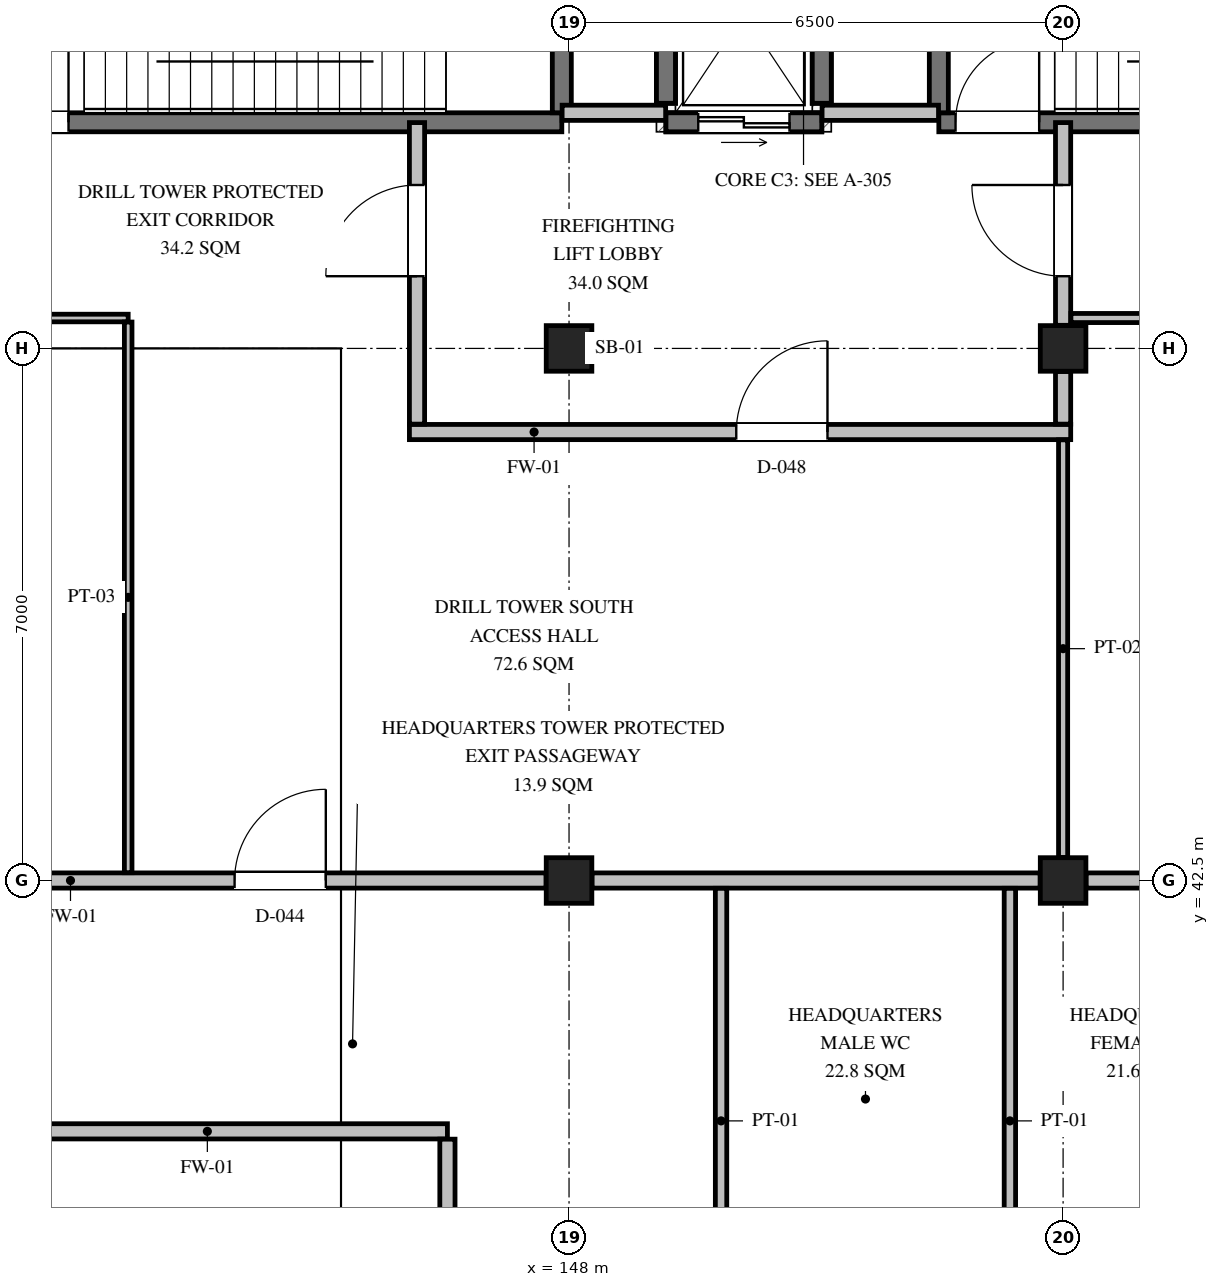
"""IFC4 building model, lengths in metres.
Left out: names, types, materials, properties, quantities, classifications, styles, units other than length and angle.
Written with IfcOpenShell. Run it as: python <this file> out.ifc"""

import sys

from ifc_helpers import new_model, si_unit, direction, frame, frame_2d, origin, origin_2d, place, context, subcontext, project, spatial, rectangle, extrude, element, fill, save


model = new_model("IFC4")
c1 = context("Model", 3, precision=1e-05, world=origin(), true_north=direction((0.0, 1.0)))
c2 = subcontext(c1, "Body", "Model", "MODEL_VIEW")
j1 = project(units=[si_unit("LENGTHUNIT", "METRE"), si_unit("PLANEANGLEUNIT", "RADIAN")], contexts=[c1])
p1 = place(None, origin())
s1 = spatial("IfcSite", under=j1, at=p1, CompositionType="ELEMENT")
p2 = place(p1, origin())
s2 = spatial("IfcBuilding", under=s1, at=p2, CompositionType="ELEMENT")
p3 = place(p2, frame((0.0, 0.0, 0.45)))
s3 = spatial("IfcBuildingStorey", under=s2, at=p3, CompositionType="ELEMENT", Elevation=0.45)
for number, where, z_axis, x_axis in (
    (1, (148.0, 42.5, -0.45), (0.0, 0.0, 1.0), (1.0, 0.0, 0.0)),
    (2, (148.0, 49.5, -0.45), (0.0, 0.0, 1.0), (1.0, 0.0, 0.0)),
    (3, (154.5, 42.5, -0.45), (0.0, 0.0, 1.0), (1.0, 0.0, 0.0)),
    (4, (154.5, 49.5, -0.45), (0.0, 0.0, 1.0), (1.0, 0.0, 0.0)),
):
    element("IfcColumn", number, at=place(p3, frame(where, z_axis=z_axis, x_axis=x_axis)), inside=s3, PredefinedType="COLUMN", context=c2, shape_type="SweptSolid", body=[
        extrude(rectangle(XDim=0.6, YDim=0.6, at=origin_2d()), origin(), (0.0, 0.0, 1.0), 5.85),
    ])
p4 = place(p3, frame((140.095, 52.475, 0.0), z_axis=(0.0, 0.0, 1.0), x_axis=(1.0, 0.0, 0.0)))
e5 = element("IfcWall", 5, at=p4, inside=s3, PredefinedType="SHEAR", context=c2, shape_type="SweptSolid", body=[
    extrude(rectangle(XDim=7.81, YDim=0.25, at=frame_2d((3.905, 0.0))), origin(), (0.0, 0.0, 1.0), 5.2),
])
p5 = place(p4, frame((0.22, 0.0, 0.0)))
e6 = element("IfcOpeningElement", 6, at=p5, cuts=e5, PredefinedType="OPENING", context=c2, shape_type="SweptSolid", body=[
    extrude(rectangle(XDim=1.1, YDim=2.15, at=frame_2d((0.55, 1.075))), frame((0.0, 0.135, 0.0), z_axis=(0.0, -1.0, 0.0), x_axis=(1.0, 0.0, 0.0)), (0.0, 0.0, 1.0), 0.27),
])
p6 = place(p3, frame((147.905, 52.6, 0.0), z_axis=(0.0, 0.0, 1.0), x_axis=(0.0, 1.0, 0.0)))
e7 = element("IfcWall", 7, at=p6, inside=s3, PredefinedType="SHEAR", context=c2, shape_type="SweptSolid", body=[
    extrude(rectangle(XDim=2.9, YDim=0.25, at=frame_2d((1.45, 0.0))), origin(), (0.0, 0.0, 1.0), 5.2),
])
p7 = place(p3, frame((152.865, 52.475, 0.0), z_axis=(0.0, 0.0, 1.0), x_axis=(1.0, 0.0, 0.0)))
e8 = element("IfcWall", 8, at=p7, inside=s3, PredefinedType="SHEAR", context=c2, shape_type="SweptSolid", body=[
    extrude(rectangle(XDim=7.935, YDim=0.25, at=frame_2d((3.968, 0.0))), origin(), (0.0, 0.0, 1.0), 5.2),
])
p8 = place(p7, frame((0.22, 0.0, 0.0)))
e9 = element("IfcOpeningElement", 9, at=p8, cuts=e8, PredefinedType="OPENING", context=c2, shape_type="SweptSolid", body=[
    extrude(rectangle(XDim=1.1, YDim=2.15, at=frame_2d((0.55, 1.075))), frame((0.0, 0.135, 0.0), z_axis=(0.0, -1.0, 0.0), x_axis=(1.0, 0.0, 0.0)), (0.0, 0.0, 1.0), 0.27),
])
p9 = place(p3, frame((152.865, 52.6, 0.0), z_axis=(0.0, 0.0, 1.0), x_axis=(0.0, 1.0, 0.0)))
e10 = element("IfcWall", 10, at=p9, inside=s3, PredefinedType="SHEAR", context=c2, shape_type="SweptSolid", body=[
    extrude(rectangle(XDim=2.9, YDim=0.25, at=frame_2d((1.45, 0.0))), origin(), (0.0, 0.0, 1.0), 5.2),
])
p10 = place(p3, frame((149.275, 52.475, -1.65), z_axis=(0.0, 0.0, 1.0), x_axis=(1.0, 0.0, 0.0)))
e11 = element("IfcWall", 11, at=p10, inside=s3, PredefinedType="SHEAR", context=c2, shape_type="SweptSolid", body=[
    extrude(rectangle(XDim=2.05, YDim=0.25, at=frame_2d((1.025, 0.0))), origin(), (0.0, 0.0, 1.0), 1.65),
])
for number, where, z_axis, x_axis in (
    (12, (149.275, 52.725, -1.65), (0.0, 0.0, 1.0), (0.0, 1.0, 0.0)),
    (13, (151.325, 52.725, -1.65), (0.0, 0.0, 1.0), (0.0, 1.0, 0.0)),
):
    element("IfcWall", number, at=place(p3, frame(where, z_axis=z_axis, x_axis=x_axis)), inside=s3, PredefinedType="SHEAR", context=c2, shape_type="SweptSolid", body=[
        extrude(rectangle(XDim=2.35, YDim=0.25, at=frame_2d((1.175, 0.0))), origin(), (0.0, 0.0, 1.0), 1.65),
    ])
p11 = place(p3, frame((149.275, 52.475, 0.0), z_axis=(0.0, 0.0, 1.0), x_axis=(1.0, 0.0, 0.0)))
e14 = element("IfcWall", 14, at=p11, inside=s3, PredefinedType="SHEAR", context=c2, shape_type="SweptSolid", body=[
    extrude(rectangle(XDim=2.05, YDim=0.25, at=frame_2d((1.025, 0.0))), origin(), (0.0, 0.0, 1.0), 5.2),
])
p12 = place(p11, frame((0.425, 0.0, 0.0)))
e15 = element("IfcOpeningElement", 15, at=p12, cuts=e14, PredefinedType="OPENING", context=c2, shape_type="SweptSolid", body=[
    extrude(rectangle(XDim=1.2, YDim=2.15, at=frame_2d((0.6, 1.075))), frame((0.0, 0.135, 0.0), z_axis=(0.0, -1.0, 0.0), x_axis=(1.0, 0.0, 0.0)), (0.0, 0.0, 1.0), 0.27),
])
for number, where, z_axis, x_axis in (
    (16, (149.275, 52.725, 0.0), (0.0, 0.0, 1.0), (0.0, 1.0, 0.0)),
    (17, (151.325, 52.725, 0.0), (0.0, 0.0, 1.0), (0.0, 1.0, 0.0)),
):
    element("IfcWall", number, at=place(p3, frame(where, z_axis=z_axis, x_axis=x_axis)), inside=s3, PredefinedType="SHEAR", context=c2, shape_type="SweptSolid", body=[
        extrude(rectangle(XDim=2.35, YDim=0.25, at=frame_2d((1.175, 0.0))), origin(), (0.0, 0.0, 1.0), 5.2),
    ])
p13 = place(p3, frame((140.302, 42.5, 0.0), z_axis=(0.0, 0.0, 1.0), x_axis=(1.0, 0.0, 0.0)))
e18 = element("IfcWall", 18, at=p13, inside=s3, PredefinedType="PARTITIONING", context=c2, shape_type="SweptSolid", body=[
    extrude(rectangle(XDim=7.396, YDim=0.2, at=frame_2d((3.698, 0.0))), origin(), (0.0, 0.0, 1.0), 4.494),
])
p14 = place(p13, frame((3.298, 0.0, 0.0)))
e19 = element("IfcOpeningElement", 19, at=p14, cuts=e18, PredefinedType="OPENING", context=c2, shape_type="SweptSolid", body=[
    extrude(rectangle(XDim=1.2, YDim=2.15, at=frame_2d((0.6, 1.075))), frame((0.0, 0.11, 0.0), z_axis=(0.0, -1.0, 0.0), x_axis=(1.0, 0.0, 0.0)), (0.0, 0.0, 1.0), 0.22),
])
p15 = place(p3, frame((148.302, 42.5, 0.0), z_axis=(0.0, 0.0, 1.0), x_axis=(1.0, 0.0, 0.0)))
e20 = element("IfcWall", 20, at=p15, inside=s3, PredefinedType="PARTITIONING", context=c2, shape_type="SweptSolid", body=[
    extrude(rectangle(XDim=5.896, YDim=0.2, at=frame_2d((2.948, 0.0))), origin(), (0.0, 0.0, 1.0), 4.694),
])
p16 = place(p3, frame((154.802, 42.5, 0.0), z_axis=(0.0, 0.0, 1.0), x_axis=(1.0, 0.0, 0.0)))
e21 = element("IfcWall", 21, at=p16, inside=s3, PredefinedType="PARTITIONING", context=c2, shape_type="SweptSolid", body=[
    extrude(rectangle(XDim=5.896, YDim=0.2, at=frame_2d((2.948, 0.0))), origin(), (0.0, 0.0, 1.0), 4.394),
])
p17 = place(p3, frame((147.909, 52.6, 0.0), z_axis=(0.0, 0.0, 1.0), x_axis=(1.0, 0.0, 0.0)))
e22 = element("IfcWall", 22, at=p17, inside=s3, PredefinedType="PARTITIONING", context=c2, shape_type="SweptSolid", body=[
    extrude(rectangle(XDim=1.362, YDim=0.2, at=frame_2d((0.681, 0.0))), origin(), (0.0, 0.0, 1.0), 5.2),
])
p18 = place(p3, frame((151.329, 52.6, 0.0), z_axis=(0.0, 0.0, 1.0), x_axis=(1.0, 0.0, 0.0)))
e23 = element("IfcWall", 23, at=p18, inside=s3, PredefinedType="PARTITIONING", context=c2, shape_type="SweptSolid", body=[
    extrude(rectangle(XDim=1.532, YDim=0.2, at=frame_2d((0.766, 0.0))), origin(), (0.0, 0.0, 1.0), 5.2),
])
p19 = place(p3, frame((145.9, 48.4, 0.0), z_axis=(0.0, 0.0, 1.0), x_axis=(1.0, 0.0, 0.0)))
e24 = element("IfcWall", 24, at=p19, inside=s3, PredefinedType="PARTITIONING", context=c2, shape_type="SweptSolid", body=[
    extrude(rectangle(XDim=8.7, YDim=0.2, at=frame_2d((4.35, 0.0))), origin(), (0.0, 0.0, 1.0), 5.2),
])
p20 = place(p19, frame((4.3, 0.0, 0.0)))
e25 = element("IfcOpeningElement", 25, at=p20, cuts=e24, PredefinedType="OPENING", context=c2, shape_type="SweptSolid", body=[
    extrude(rectangle(XDim=1.2, YDim=2.15, at=frame_2d((0.6, 1.075))), frame((0.0, 0.11, 0.0), z_axis=(0.0, -1.0, 0.0), x_axis=(1.0, 0.0, 0.0)), (0.0, 0.0, 1.0), 0.22),
])
p21 = place(p3, frame((146.0, 48.504, 0.0), z_axis=(0.0, 0.0, 1.0), x_axis=(0.0, 1.0, 0.0)))
e26 = element("IfcWall", 26, at=p21, inside=s3, PredefinedType="PARTITIONING", context=c2, shape_type="SweptSolid", body=[
    extrude(rectangle(XDim=3.967, YDim=0.2, at=frame_2d((1.983, 0.0))), origin(), (0.0, 0.0, 1.0), 5.2),
])
p22 = place(p21, frame((1.946, 0.0, 0.0)))
e27 = element("IfcOpeningElement", 27, at=p22, cuts=e26, PredefinedType="OPENING", context=c2, shape_type="SweptSolid", body=[
    extrude(rectangle(XDim=1.2, YDim=2.15, at=frame_2d((0.6, 1.075))), frame((0.0, 0.11, 0.0), z_axis=(0.0, -1.0, 0.0), x_axis=(1.0, 0.0, 0.0)), (0.0, 0.0, 1.0), 0.22),
])
p23 = place(p3, frame((154.5, 48.504, 0.0), z_axis=(0.0, 0.0, 1.0), x_axis=(0.0, 1.0, 0.0)))
e28 = element("IfcWall", 28, at=p23, inside=s3, PredefinedType="PARTITIONING", context=c2, shape_type="SweptSolid", body=[
    extrude(rectangle(XDim=0.692, YDim=0.2, at=frame_2d((0.346, 0.0))), origin(), (0.0, 0.0, 1.0), 4.854),
])
p24 = place(p3, frame((154.5, 49.804, 0.0), z_axis=(0.0, 0.0, 1.0), x_axis=(0.0, 1.0, 0.0)))
e29 = element("IfcWall", 29, at=p24, inside=s3, PredefinedType="PARTITIONING", context=c2, shape_type="SweptSolid", body=[
    extrude(rectangle(XDim=2.667, YDim=0.2, at=frame_2d((1.333, 0.0))), origin(), (0.0, 0.0, 1.0), 5.2),
])
p25 = place(p24, frame((0.646, 0.0, 0.0)))
e30 = element("IfcOpeningElement", 30, at=p25, cuts=e29, PredefinedType="OPENING", context=c2, shape_type="SweptSolid", body=[
    extrude(rectangle(XDim=1.2, YDim=2.15, at=frame_2d((0.6, 1.075))), frame((0.0, 0.11, 0.0), z_axis=(0.0, -1.0, 0.0), x_axis=(1.0, 0.0, 0.0)), (0.0, 0.0, 1.0), 0.22),
])
p26 = place(p3, frame((140.083, 39.2, 0.0), z_axis=(0.0, 0.0, 1.0), x_axis=(1.0, 0.0, 0.0)))
e31 = element("IfcWall", 31, at=p26, inside=s3, PredefinedType="PARTITIONING", context=c2, shape_type="SweptSolid", body=[
    extrude(rectangle(XDim=6.317, YDim=0.2, at=frame_2d((3.158, 0.0))), origin(), (0.0, 0.0, 1.0), 5.2),
])
p27 = place(p3, frame((146.4, 31.663, 0.0), z_axis=(0.0, 0.0, 1.0), x_axis=(0.0, 1.0, 0.0)))
e32 = element("IfcWall", 32, at=p27, inside=s3, PredefinedType="PARTITIONING", context=c2, shape_type="SweptSolid", body=[
    extrude(rectangle(XDim=7.434, YDim=0.2, at=frame_2d((3.717, 0.0))), origin(), (0.0, 0.0, 1.0), 4.994),
])
p28 = place(p27, frame((4.617, 0.0, 0.0)))
e33 = element("IfcOpeningElement", 33, at=p28, cuts=e32, PredefinedType="OPENING", context=c2, shape_type="SweptSolid", body=[
    extrude(rectangle(XDim=1.4, YDim=2.2, at=frame_2d((0.7, 1.1))), frame((0.0, 0.11, 0.0), z_axis=(0.0, -1.0, 0.0), x_axis=(1.0, 0.0, 0.0)), (0.0, 0.0, 1.0), 0.22),
])
p29 = place(p3, frame((150.0, 36.278, 0.0), z_axis=(0.0, 0.0, 1.0), x_axis=(0.0, 1.0, 0.0)))
e34 = element("IfcWall", 34, at=p29, inside=s3, PredefinedType="PARTITIONING", context=c2, shape_type="SweptSolid", body=[
    extrude(rectangle(XDim=6.119, YDim=0.15, at=frame_2d((3.06, 0.0))), origin(), (0.0, 0.0, 1.0), 4.95),
])
p30 = place(p3, frame((153.8, 36.278, 0.0), z_axis=(0.0, 0.0, 1.0), x_axis=(0.0, 1.0, 0.0)))
e35 = element("IfcWall", 35, at=p30, inside=s3, PredefinedType="PARTITIONING", context=c2, shape_type="SweptSolid", body=[
    extrude(rectangle(XDim=6.119, YDim=0.15, at=frame_2d((3.06, 0.0))), origin(), (0.0, 0.0, 1.0), 5.2),
])
p31 = place(p3, frame((132.153, 49.9, 0.0), z_axis=(0.0, 0.0, 1.0), x_axis=(1.0, 0.0, 0.0)))
e36 = element("IfcWall", 36, at=p31, inside=s3, PredefinedType="PARTITIONING", context=c2, shape_type="SweptSolid", body=[
    extrude(rectangle(XDim=10.047, YDim=0.1, at=frame_2d((5.023, 0.0))), origin(), (0.0, 0.0, 1.0), 5.2),
])
p32 = place(p31, frame((4.523, 0.0, 0.0)))
e37 = element("IfcOpeningElement", 37, at=p32, cuts=e36, PredefinedType="OPENING", context=c2, shape_type="SweptSolid", body=[
    extrude(rectangle(XDim=1.0, YDim=2.1, at=frame_2d((0.5, 1.05))), frame((0.0, 0.06, 0.0), z_axis=(0.0, -1.0, 0.0), x_axis=(1.0, 0.0, 0.0)), (0.0, 0.0, 1.0), 0.12),
])
p33 = place(p3, frame((142.2, 42.603, 0.0), z_axis=(0.0, 0.0, 1.0), x_axis=(0.0, 1.0, 0.0)))
e38 = element("IfcWall", 38, at=p33, inside=s3, PredefinedType="PARTITIONING", context=c2, shape_type="SweptSolid", body=[
    extrude(rectangle(XDim=7.244, YDim=0.1, at=frame_2d((3.622, 0.0))), origin(), (0.0, 0.0, 1.0), 5.2),
])
p34 = place(p3, frame((154.603, 49.9, 0.0), z_axis=(0.0, 0.0, 1.0), x_axis=(1.0, 0.0, 0.0)))
e39 = element("IfcWall", 39, at=p34, inside=s3, PredefinedType="PARTITIONING", context=c2, shape_type="SweptSolid", body=[
    extrude(rectangle(XDim=6.194, YDim=0.12, at=frame_2d((3.097, 0.0))), origin(), (0.0, 0.0, 1.0), 5.2),
])
p35 = place(p34, frame((2.347, 0.0, 0.0)))
e40 = element("IfcOpeningElement", 40, at=p35, cuts=e39, PredefinedType="OPENING", context=c2, shape_type="SweptSolid", body=[
    extrude(rectangle(XDim=1.5, YDim=2.25, at=frame_2d((0.75, 1.125))), frame((0.0, 0.07, 0.0), z_axis=(0.0, -1.0, 0.0), x_axis=(1.0, 0.0, 0.0)), (0.0, 0.0, 1.0), 0.14),
])
p36 = place(p3, frame((154.5, 42.803, 0.0), z_axis=(0.0, 0.0, 1.0), x_axis=(0.0, 1.0, 0.0)))
e41 = element("IfcWall", 41, at=p36, inside=s3, PredefinedType="PARTITIONING", context=c2, shape_type="SweptSolid", body=[
    extrude(rectangle(XDim=5.494, YDim=0.12, at=frame_2d((2.747, 0.0))), origin(), (0.0, 0.0, 1.0), 4.854),
])
p37 = place(p5, frame((1.1, 0.0, 0.0), z_axis=(0.0, 0.0, 1.0), x_axis=(-1.0, 0.0, 0.0)))
e42 = element("IfcDoor", 42, at=p37, inside=s3, OperationType="SINGLE_SWING_RIGHT", PredefinedType="DOOR", context=c2, shape_type="SweptSolid", body=[
    extrude(rectangle(XDim=1.1, YDim=2.15, at=frame_2d((0.55, 1.075))), frame((0.0, 0.025, 0.0), z_axis=(0.0, -1.0, 0.0), x_axis=(1.0, 0.0, 0.0)), (0.0, 0.0, 1.0), 0.05),
])
fill(e6, e42)
p38 = place(p8, frame((1.1, 0.0, 0.0), z_axis=(0.0, 0.0, 1.0), x_axis=(-1.0, 0.0, 0.0)))
e43 = element("IfcDoor", 43, at=p38, inside=s3, OperationType="SINGLE_SWING_RIGHT", PredefinedType="DOOR", context=c2, shape_type="SweptSolid", body=[
    extrude(rectangle(XDim=1.1, YDim=2.15, at=frame_2d((0.55, 1.075))), frame((0.0, 0.025, 0.0), z_axis=(0.0, -1.0, 0.0), x_axis=(1.0, 0.0, 0.0)), (0.0, 0.0, 1.0), 0.05),
])
fill(e9, e43)
p39 = place(p12, origin())
e44 = element("IfcDoor", 44, at=p39, inside=s3, OperationType="DOUBLE_DOOR_SLIDING", PredefinedType="DOOR", context=c2, shape_type="SweptSolid", body=[
    extrude(rectangle(XDim=1.2, YDim=2.15, at=frame_2d((0.6, 1.075))), frame((0.0, 0.025, 0.0), z_axis=(0.0, -1.0, 0.0), x_axis=(1.0, 0.0, 0.0)), (0.0, 0.0, 1.0), 0.05),
])
fill(e15, e44)
p40 = place(p14, origin())
e45 = element("IfcDoor", 45, at=p40, inside=s3, OperationType="SINGLE_SWING_RIGHT", PredefinedType="DOOR", context=c2, shape_type="SweptSolid", body=[
    extrude(rectangle(XDim=1.2, YDim=2.15, at=frame_2d((0.6, 1.075))), frame((0.0, 0.025, 0.0), z_axis=(0.0, -1.0, 0.0), x_axis=(1.0, 0.0, 0.0)), (0.0, 0.0, 1.0), 0.05),
])
fill(e19, e45)
p41 = place(p20, origin())
e46 = element("IfcDoor", 46, at=p41, inside=s3, OperationType="SINGLE_SWING_RIGHT", PredefinedType="DOOR", context=c2, shape_type="SweptSolid", body=[
    extrude(rectangle(XDim=1.2, YDim=2.15, at=frame_2d((0.6, 1.075))), frame((0.0, 0.025, 0.0), z_axis=(0.0, -1.0, 0.0), x_axis=(1.0, 0.0, 0.0)), (0.0, 0.0, 1.0), 0.05),
])
fill(e25, e46)
p42 = place(p22, origin())
e47 = element("IfcDoor", 47, at=p42, inside=s3, OperationType="SINGLE_SWING_LEFT", PredefinedType="DOOR", context=c2, shape_type="SweptSolid", body=[
    extrude(rectangle(XDim=1.2, YDim=2.15, at=frame_2d((0.6, 1.075))), frame((0.0, 0.025, 0.0), z_axis=(0.0, -1.0, 0.0), x_axis=(1.0, 0.0, 0.0)), (0.0, 0.0, 1.0), 0.05),
])
fill(e27, e47)
p43 = place(p25, origin())
e48 = element("IfcDoor", 48, at=p43, inside=s3, OperationType="SINGLE_SWING_RIGHT", PredefinedType="DOOR", context=c2, shape_type="SweptSolid", body=[
    extrude(rectangle(XDim=1.2, YDim=2.15, at=frame_2d((0.6, 1.075))), frame((0.0, 0.025, 0.0), z_axis=(0.0, -1.0, 0.0), x_axis=(1.0, 0.0, 0.0)), (0.0, 0.0, 1.0), 0.05),
])
fill(e30, e48)
save(model, sys.argv[1])
